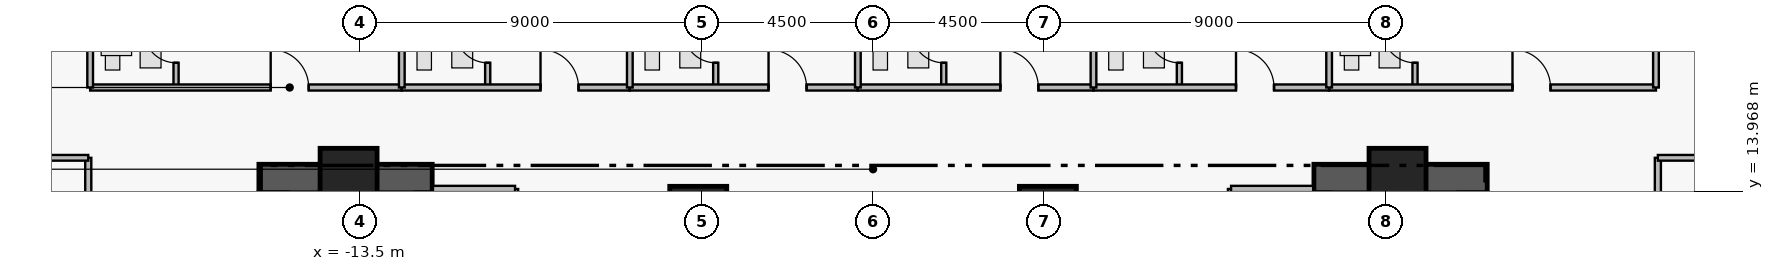
"""IFC4 building model, lengths in metres.
Left out: names, types, materials, properties, quantities, classifications, styles, units other than length and angle.
Written with IfcOpenShell. Run it as: python <this file> out.ifc"""

import sys

from ifc_helpers import new_model, si_unit, direction, frame, frame_2d, origin, origin_2d, place, context, subcontext, project, spatial, rectangle, extrude, element, fill, save


model = new_model("IFC4")
c1 = context("Model", 3, precision=1e-05, world=origin(), true_north=direction((0.0, 1.0)))
c2 = subcontext(c1, "Body", "Model", "MODEL_VIEW")
j1 = project(units=[si_unit("LENGTHUNIT", "METRE"), si_unit("PLANEANGLEUNIT", "RADIAN")], contexts=[c1])
p1 = place(None, origin())
s1 = spatial("IfcSite", under=j1, at=p1, CompositionType="ELEMENT")
p2 = place(p1, origin())
s2 = spatial("IfcBuilding", under=s1, at=p2, CompositionType="ELEMENT")
p3 = place(p2, frame((0.0, 0.0, 99.3)))
s3 = spatial("IfcBuildingStorey", under=s2, at=p3, CompositionType="ELEMENT", Elevation=99.3)
for number, where, z_axis, x_axis in (
    (1, (-16.16, 14.305, 0.0), (0.0, 0.0, 1.0), (1.0, 0.0, 0.0)),
    (2, (11.6, 14.305, 0.0), (0.0, 0.0, 1.0), (1.0, 0.0, 0.0)),
):
    element("IfcWall", number, at=place(p3, frame(where, z_axis=z_axis, x_axis=x_axis)), inside=s3, PredefinedType="SHEAR", context=c2, shape_type="SweptSolid", body=[
        extrude(rectangle(XDim=4.56, YDim=0.75, at=frame_2d((2.28, 0.0))), origin(), (0.0, 0.0, 1.0), 3.46),
    ])
for number, where, z_axis, x_axis in (
    (3, (-13.8, 14.35, 0.0), (0.0, 0.0, 1.0), (1.0, 0.0, 0.0)),
    (4, (-4.6, 13.35, 0.0), (0.0, 0.0, 1.0), (1.0, 0.0, 0.0)),
    (5, (4.6, 13.35, 0.0), (0.0, 0.0, 1.0), (1.0, 0.0, 0.0)),
    (6, (13.8, 14.35, 0.0), (0.0, 0.0, 1.0), (1.0, 0.0, 0.0)),
):
    element("IfcColumn", number, at=place(p3, frame(where, z_axis=z_axis, x_axis=x_axis)), inside=s3, PredefinedType="COLUMN", context=c2, shape_type="SweptSolid", body=[
        extrude(rectangle(XDim=1.5, YDim=1.5, at=origin_2d()), origin(), (0.0, 0.0, 1.0), 3.65),
    ])
p4 = place(p3, frame((-18.34, 16.7, 0.0), z_axis=(0.0, 0.0, 1.0), x_axis=(0.0, 1.0, 0.0)))
e7 = element("IfcWall", 7, at=p4, inside=s3, PredefinedType="PLUMBINGWALL", context=c2, shape_type="SweptSolid", body=[
    extrude(rectangle(XDim=2.36, YDim=0.135, at=frame_2d((1.18, 0.0))), origin(), (0.0, 0.0, 1.0), 3.43),
])
p5 = place(p4, frame((0.65, 0.0, 0.0)))
e8 = element("IfcOpeningElement", 8, at=p5, cuts=e7, PredefinedType="OPENING", context=c2, shape_type="SweptSolid", body=[
    extrude(rectangle(XDim=0.85, YDim=2.1, at=frame_2d((0.425, 1.05))), frame((0.0, 0.077, 0.0), z_axis=(0.0, -1.0, 0.0), x_axis=(1.0, 0.0, 0.0)), (0.0, 0.0, 1.0), 0.155),
])
p6 = place(p3, frame((-20.6, 16.7, 0.0), z_axis=(0.0, 0.0, 1.0), x_axis=(1.0, 0.0, 0.0)))
e9 = element("IfcWall", 9, at=p6, inside=s3, PredefinedType="PARTITIONING", context=c2, shape_type="SweptSolid", body=[
    extrude(rectangle(XDim=8.2, YDim=0.16, at=frame_2d((4.1, 0.0))), origin(), (0.0, 0.0, 1.0), 2.973),
])
p7 = place(p6, frame((4.75, 0.0, 0.0)))
e10 = element("IfcOpeningElement", 10, at=p7, cuts=e9, PredefinedType="OPENING", context=c2, shape_type="SweptSolid", body=[
    extrude(rectangle(XDim=1.0, YDim=2.15, at=frame_2d((0.5, 1.075))), frame((0.0, 0.09, 0.0), z_axis=(0.0, -1.0, 0.0), x_axis=(1.0, 0.0, 0.0)), (0.0, 0.0, 1.0), 0.18),
])
p8 = place(p3, frame((-10.14, 16.7, 0.0), z_axis=(0.0, 0.0, 1.0), x_axis=(0.0, 1.0, 0.0)))
e11 = element("IfcWall", 11, at=p8, inside=s3, PredefinedType="PLUMBINGWALL", context=c2, shape_type="SweptSolid", body=[
    extrude(rectangle(XDim=2.36, YDim=0.135, at=frame_2d((1.18, 0.0))), origin(), (0.0, 0.0, 1.0), 3.43),
])
p9 = place(p8, frame((0.65, 0.0, 0.0)))
e12 = element("IfcOpeningElement", 12, at=p9, cuts=e11, PredefinedType="OPENING", context=c2, shape_type="SweptSolid", body=[
    extrude(rectangle(XDim=0.85, YDim=2.1, at=frame_2d((0.425, 1.05))), frame((0.0, 0.077, 0.0), z_axis=(0.0, -1.0, 0.0), x_axis=(1.0, 0.0, 0.0)), (0.0, 0.0, 1.0), 0.155),
])
p10 = place(p3, frame((-12.4, 16.7, 0.0), z_axis=(0.0, 0.0, 1.0), x_axis=(1.0, 0.0, 0.0)))
e13 = element("IfcWall", 13, at=p10, inside=s3, PredefinedType="PARTITIONING", context=c2, shape_type="SweptSolid", body=[
    extrude(rectangle(XDim=6.0, YDim=0.16, at=frame_2d((3.0, 0.0))), origin(), (0.0, 0.0, 1.0), 2.973),
])
p11 = place(p10, frame((3.65, 0.0, 0.0)))
e14 = element("IfcOpeningElement", 14, at=p11, cuts=e13, PredefinedType="OPENING", context=c2, shape_type="SweptSolid", body=[
    extrude(rectangle(XDim=1.0, YDim=2.15, at=frame_2d((0.5, 1.075))), frame((0.0, 0.09, 0.0), z_axis=(0.0, -1.0, 0.0), x_axis=(1.0, 0.0, 0.0)), (0.0, 0.0, 1.0), 0.18),
])
p12 = place(p3, frame((-4.14, 16.7, 0.0), z_axis=(0.0, 0.0, 1.0), x_axis=(0.0, 1.0, 0.0)))
e15 = element("IfcWall", 15, at=p12, inside=s3, PredefinedType="PLUMBINGWALL", context=c2, shape_type="SweptSolid", body=[
    extrude(rectangle(XDim=2.36, YDim=0.135, at=frame_2d((1.18, 0.0))), origin(), (0.0, 0.0, 1.0), 2.503),
])
p13 = place(p12, frame((0.65, 0.0, 0.0)))
e16 = element("IfcOpeningElement", 16, at=p13, cuts=e15, PredefinedType="OPENING", context=c2, shape_type="SweptSolid", body=[
    extrude(rectangle(XDim=0.85, YDim=2.1, at=frame_2d((0.425, 1.05))), frame((0.0, 0.077, 0.0), z_axis=(0.0, -1.0, 0.0), x_axis=(1.0, 0.0, 0.0)), (0.0, 0.0, 1.0), 0.155),
])
p14 = place(p3, frame((-6.4, 16.7, 0.0), z_axis=(0.0, 0.0, 1.0), x_axis=(1.0, 0.0, 0.0)))
e17 = element("IfcWall", 17, at=p14, inside=s3, PredefinedType="PARTITIONING", context=c2, shape_type="SweptSolid", body=[
    extrude(rectangle(XDim=6.0, YDim=0.16, at=frame_2d((3.0, 0.0))), origin(), (0.0, 0.0, 1.0), 2.973),
])
p15 = place(p14, frame((3.65, 0.0, 0.0)))
e18 = element("IfcOpeningElement", 18, at=p15, cuts=e17, PredefinedType="OPENING", context=c2, shape_type="SweptSolid", body=[
    extrude(rectangle(XDim=1.0, YDim=2.15, at=frame_2d((0.5, 1.075))), frame((0.0, 0.09, 0.0), z_axis=(0.0, -1.0, 0.0), x_axis=(1.0, 0.0, 0.0)), (0.0, 0.0, 1.0), 0.18),
])
p16 = place(p3, frame((1.86, 16.7, 0.0), z_axis=(0.0, 0.0, 1.0), x_axis=(0.0, 1.0, 0.0)))
e19 = element("IfcWall", 19, at=p16, inside=s3, PredefinedType="PLUMBINGWALL", context=c2, shape_type="SweptSolid", body=[
    extrude(rectangle(XDim=2.36, YDim=0.135, at=frame_2d((1.18, 0.0))), origin(), (0.0, 0.0, 1.0), 3.43),
])
p17 = place(p16, frame((0.65, 0.0, 0.0)))
e20 = element("IfcOpeningElement", 20, at=p17, cuts=e19, PredefinedType="OPENING", context=c2, shape_type="SweptSolid", body=[
    extrude(rectangle(XDim=0.85, YDim=2.1, at=frame_2d((0.425, 1.05))), frame((0.0, 0.077, 0.0), z_axis=(0.0, -1.0, 0.0), x_axis=(1.0, 0.0, 0.0)), (0.0, 0.0, 1.0), 0.155),
])
p18 = place(p3, frame((-0.4, 16.7, 0.0), z_axis=(0.0, 0.0, 1.0), x_axis=(1.0, 0.0, 0.0)))
e21 = element("IfcWall", 21, at=p18, inside=s3, PredefinedType="PARTITIONING", context=c2, shape_type="SweptSolid", body=[
    extrude(rectangle(XDim=6.2, YDim=0.16, at=frame_2d((3.1, 0.0))), origin(), (0.0, 0.0, 1.0), 2.973),
])
p19 = place(p18, frame((3.75, 0.0, 0.0)))
e22 = element("IfcOpeningElement", 22, at=p19, cuts=e21, PredefinedType="OPENING", context=c2, shape_type="SweptSolid", body=[
    extrude(rectangle(XDim=1.0, YDim=2.15, at=frame_2d((0.5, 1.075))), frame((0.0, 0.09, 0.0), z_axis=(0.0, -1.0, 0.0), x_axis=(1.0, 0.0, 0.0)), (0.0, 0.0, 1.0), 0.18),
])
p20 = place(p3, frame((8.06, 16.7, 0.0), z_axis=(0.0, 0.0, 1.0), x_axis=(0.0, 1.0, 0.0)))
e23 = element("IfcWall", 23, at=p20, inside=s3, PredefinedType="PLUMBINGWALL", context=c2, shape_type="SweptSolid", body=[
    extrude(rectangle(XDim=2.36, YDim=0.135, at=frame_2d((1.18, 0.0))), origin(), (0.0, 0.0, 1.0), 3.43),
])
p21 = place(p20, frame((0.65, 0.0, 0.0)))
e24 = element("IfcOpeningElement", 24, at=p21, cuts=e23, PredefinedType="OPENING", context=c2, shape_type="SweptSolid", body=[
    extrude(rectangle(XDim=0.85, YDim=2.1, at=frame_2d((0.425, 1.05))), frame((0.0, 0.077, 0.0), z_axis=(0.0, -1.0, 0.0), x_axis=(1.0, 0.0, 0.0)), (0.0, 0.0, 1.0), 0.155),
])
p22 = place(p3, frame((5.8, 16.7, 0.0), z_axis=(0.0, 0.0, 1.0), x_axis=(1.0, 0.0, 0.0)))
e25 = element("IfcWall", 25, at=p22, inside=s3, PredefinedType="PARTITIONING", context=c2, shape_type="SweptSolid", body=[
    extrude(rectangle(XDim=6.2, YDim=0.16, at=frame_2d((3.1, 0.0))), origin(), (0.0, 0.0, 1.0), 2.973),
])
p23 = place(p22, frame((3.75, 0.0, 0.0)))
e26 = element("IfcOpeningElement", 26, at=p23, cuts=e25, PredefinedType="OPENING", context=c2, shape_type="SweptSolid", body=[
    extrude(rectangle(XDim=1.0, YDim=2.15, at=frame_2d((0.5, 1.075))), frame((0.0, 0.09, 0.0), z_axis=(0.0, -1.0, 0.0), x_axis=(1.0, 0.0, 0.0)), (0.0, 0.0, 1.0), 0.18),
])
p24 = place(p3, frame((14.26, 16.7, 0.0), z_axis=(0.0, 0.0, 1.0), x_axis=(0.0, 1.0, 0.0)))
e27 = element("IfcWall", 27, at=p24, inside=s3, PredefinedType="PLUMBINGWALL", context=c2, shape_type="SweptSolid", body=[
    extrude(rectangle(XDim=2.36, YDim=0.135, at=frame_2d((1.18, 0.0))), origin(), (0.0, 0.0, 1.0), 2.503),
])
p25 = place(p24, frame((0.65, 0.0, 0.0)))
e28 = element("IfcOpeningElement", 28, at=p25, cuts=e27, PredefinedType="OPENING", context=c2, shape_type="SweptSolid", body=[
    extrude(rectangle(XDim=0.85, YDim=2.1, at=frame_2d((0.425, 1.05))), frame((0.0, 0.077, 0.0), z_axis=(0.0, -1.0, 0.0), x_axis=(1.0, 0.0, 0.0)), (0.0, 0.0, 1.0), 0.155),
])
p26 = place(p3, frame((12.0, 16.7, 0.0), z_axis=(0.0, 0.0, 1.0), x_axis=(1.0, 0.0, 0.0)))
e29 = element("IfcWall", 29, at=p26, inside=s3, PredefinedType="PARTITIONING", context=c2, shape_type="SweptSolid", body=[
    extrude(rectangle(XDim=8.6, YDim=0.16, at=frame_2d((4.3, 0.0))), origin(), (0.0, 0.0, 1.0), 2.973),
])
p27 = place(p26, frame((4.825, 0.0, 0.0)))
e30 = element("IfcOpeningElement", 30, at=p27, cuts=e29, PredefinedType="OPENING", context=c2, shape_type="SweptSolid", body=[
    extrude(rectangle(XDim=1.0, YDim=2.15, at=frame_2d((0.5, 1.075))), frame((0.0, 0.09, 0.0), z_axis=(0.0, -1.0, 0.0), x_axis=(1.0, 0.0, 0.0)), (0.0, 0.0, 1.0), 0.18),
])
p28 = place(p3, frame((20.65, 7.96, 0.0), z_axis=(0.0, 0.0, 1.0), x_axis=(0.0, 1.0, 0.0)))
e31 = element("IfcWall", 31, at=p28, inside=s3, PredefinedType="PARTITIONING", context=c2, shape_type="SweptSolid", body=[
    extrude(rectangle(XDim=6.89, YDim=0.16, at=frame_2d((3.445, 0.0))), origin(), (0.0, 0.0, 1.0), 3.43),
])
p29 = place(p28, frame((2.985, 0.0, 0.0)))
e32 = element("IfcOpeningElement", 32, at=p29, cuts=e31, PredefinedType="OPENING", context=c2, shape_type="SweptSolid", body=[
    extrude(rectangle(XDim=0.92, YDim=2.12, at=frame_2d((0.46, 1.06))), frame((0.0, 0.09, 0.0), z_axis=(0.0, -1.0, 0.0), x_axis=(1.0, 0.0, 0.0)), (0.0, 0.0, 1.0), 0.18),
])
p30 = place(p3, frame((-20.65, 8.06, 0.0), z_axis=(0.0, 0.0, 1.0), x_axis=(0.0, 1.0, 0.0)))
e33 = element("IfcWall", 33, at=p30, inside=s3, PredefinedType="PARTITIONING", context=c2, shape_type="SweptSolid", body=[
    extrude(rectangle(XDim=6.79, YDim=0.16, at=frame_2d((3.395, 0.0))), origin(), (0.0, 0.0, 1.0), 3.43),
])
p31 = place(p30, frame((2.92, 0.0, 0.0)))
e34 = element("IfcOpeningElement", 34, at=p31, cuts=e33, PredefinedType="OPENING", context=c2, shape_type="SweptSolid", body=[
    extrude(rectangle(XDim=0.95, YDim=2.15, at=frame_2d((0.475, 1.075))), frame((0.0, 0.09, 0.0), z_axis=(0.0, -1.0, 0.0), x_axis=(1.0, 0.0, 0.0)), (0.0, 0.0, 1.0), 0.18),
])
p32 = place(p3, frame((-9.42, 11.07, 0.0), z_axis=(0.0, 0.0, 1.0), x_axis=(0.0, 1.0, 0.0)))
e35 = element("IfcWall", 35, at=p32, inside=s3, PredefinedType="PARTITIONING", context=c2, shape_type="SweptSolid", body=[
    extrude(rectangle(XDim=2.96, YDim=0.165, at=frame_2d((1.48, 0.0))), origin(), (0.0, 0.0, 1.0), 3.43),
])
p33 = place(p3, frame((-11.58, 14.03, 0.0), z_axis=(0.0, 0.0, 1.0), x_axis=(1.0, 0.0, 0.0)))
e36 = element("IfcWall", 36, at=p33, inside=s3, PredefinedType="PARTITIONING", context=c2, shape_type="SweptSolid", body=[
    extrude(rectangle(XDim=2.16, YDim=0.165, at=frame_2d((1.08, 0.0))), origin(), (0.0, 0.0, 1.0), 3.43),
])
p34 = place(p3, frame((9.42, 11.07, 0.0), z_axis=(0.0, 0.0, 1.0), x_axis=(0.0, 1.0, 0.0)))
e37 = element("IfcWall", 37, at=p34, inside=s3, PredefinedType="PARTITIONING", context=c2, shape_type="SweptSolid", body=[
    extrude(rectangle(XDim=2.96, YDim=0.165, at=frame_2d((1.48, 0.0))), origin(), (0.0, 0.0, 1.0), 3.43),
])
p35 = place(p3, frame((9.42, 14.03, 0.0), z_axis=(0.0, 0.0, 1.0), x_axis=(1.0, 0.0, 0.0)))
e38 = element("IfcWall", 38, at=p35, inside=s3, PredefinedType="PARTITIONING", context=c2, shape_type="SweptSolid", body=[
    extrude(rectangle(XDim=2.16, YDim=0.165, at=frame_2d((1.08, 0.0))), origin(), (0.0, 0.0, 1.0), 3.43),
])
p36 = place(p3, frame((-20.6, 16.7, 0.0), z_axis=(0.0, 0.0, 1.0), x_axis=(0.0, 1.0, 0.0)))
e39 = element("IfcWall", 39, at=p36, inside=s3, PredefinedType="PARTITIONING", context=c2, shape_type="SweptSolid", body=[
    extrude(rectangle(XDim=8.2, YDim=0.15, at=frame_2d((4.1, 0.0))), origin(), (0.0, 0.0, 1.0), 3.43),
])
for number, where, z_axis, x_axis in (
    (40, (-12.4, 16.7, 0.0), (0.0, 0.0, 1.0), (0.0, 1.0, 0.0)),
    (41, (-6.4, 16.7, 0.0), (0.0, 0.0, 1.0), (0.0, 1.0, 0.0)),
    (42, (-0.4, 16.7, 0.0), (0.0, 0.0, 1.0), (0.0, 1.0, 0.0)),
    (43, (5.8, 16.7, 0.0), (0.0, 0.0, 1.0), (0.0, 1.0, 0.0)),
    (44, (12.0, 16.7, 0.0), (0.0, 0.0, 1.0), (0.0, 1.0, 0.0)),
):
    element("IfcWall", number, at=place(p3, frame(where, z_axis=z_axis, x_axis=x_axis)), inside=s3, PredefinedType="PARTITIONING", context=c2, shape_type="SweptSolid", body=[
        extrude(rectangle(XDim=11.62, YDim=0.15, at=frame_2d((5.81, 0.0))), origin(), (0.0, 0.0, 1.0), 3.43),
    ])
p37 = place(p3, frame((20.6, 16.7, 0.0), z_axis=(0.0, 0.0, 1.0), x_axis=(0.0, 1.0, 0.0)))
e45 = element("IfcWall", 45, at=p37, inside=s3, PredefinedType="PARTITIONING", context=c2, shape_type="SweptSolid", body=[
    extrude(rectangle(XDim=8.2, YDim=0.15, at=frame_2d((4.1, 0.0))), origin(), (0.0, 0.0, 1.0), 3.43),
])
for number, where, z_axis, x_axis in (
    (46, (20.65, 14.85, 0.0), (0.0, 0.0, 1.0), (1.0, 0.0, 0.0)),
    (47, (-23.84, 14.85, 0.0), (0.0, 0.0, 1.0), (1.0, 0.0, 0.0)),
):
    element("IfcWall", number, at=place(p3, frame(where, z_axis=z_axis, x_axis=x_axis)), inside=s3, PredefinedType="PARTITIONING", context=c2, shape_type="SweptSolid", body=[
        extrude(rectangle(XDim=3.19, YDim=0.15, at=frame_2d((1.595, 0.0))), origin(), (0.0, 0.0, 1.0), 3.43),
    ])
p38 = place(p5, origin())
e48 = element("IfcDoor", 48, at=p38, inside=s3, OperationType="SINGLE_SWING_RIGHT", PredefinedType="DOOR", context=c2, shape_type="SweptSolid", body=[
    extrude(rectangle(XDim=0.85, YDim=2.1, at=frame_2d((0.425, 1.05))), frame((0.0, 0.025, 0.0), z_axis=(0.0, -1.0, 0.0), x_axis=(1.0, 0.0, 0.0)), (0.0, 0.0, 1.0), 0.05),
])
fill(e8, e48)
p39 = place(p7, origin())
e49 = element("IfcDoor", 49, at=p39, inside=s3, OperationType="SINGLE_SWING_LEFT", PredefinedType="DOOR", context=c2, shape_type="SweptSolid", body=[
    extrude(rectangle(XDim=1.0, YDim=2.15, at=frame_2d((0.5, 1.075))), frame((0.0, 0.025, 0.0), z_axis=(0.0, -1.0, 0.0), x_axis=(1.0, 0.0, 0.0)), (0.0, 0.0, 1.0), 0.05),
])
fill(e10, e49)
p40 = place(p9, origin())
e50 = element("IfcDoor", 50, at=p40, inside=s3, OperationType="SINGLE_SWING_RIGHT", PredefinedType="DOOR", context=c2, shape_type="SweptSolid", body=[
    extrude(rectangle(XDim=0.85, YDim=2.1, at=frame_2d((0.425, 1.05))), frame((0.0, 0.025, 0.0), z_axis=(0.0, -1.0, 0.0), x_axis=(1.0, 0.0, 0.0)), (0.0, 0.0, 1.0), 0.05),
])
fill(e12, e50)
p41 = place(p11, origin())
e51 = element("IfcDoor", 51, at=p41, inside=s3, OperationType="SINGLE_SWING_LEFT", PredefinedType="DOOR", context=c2, shape_type="SweptSolid", body=[
    extrude(rectangle(XDim=1.0, YDim=2.15, at=frame_2d((0.5, 1.075))), frame((0.0, 0.025, 0.0), z_axis=(0.0, -1.0, 0.0), x_axis=(1.0, 0.0, 0.0)), (0.0, 0.0, 1.0), 0.05),
])
fill(e14, e51)
p42 = place(p13, origin())
e52 = element("IfcDoor", 52, at=p42, inside=s3, OperationType="SINGLE_SWING_RIGHT", PredefinedType="DOOR", context=c2, shape_type="SweptSolid", body=[
    extrude(rectangle(XDim=0.85, YDim=2.1, at=frame_2d((0.425, 1.05))), frame((0.0, 0.025, 0.0), z_axis=(0.0, -1.0, 0.0), x_axis=(1.0, 0.0, 0.0)), (0.0, 0.0, 1.0), 0.05),
])
fill(e16, e52)
p43 = place(p15, origin())
e53 = element("IfcDoor", 53, at=p43, inside=s3, OperationType="SINGLE_SWING_LEFT", PredefinedType="DOOR", context=c2, shape_type="SweptSolid", body=[
    extrude(rectangle(XDim=1.0, YDim=2.15, at=frame_2d((0.5, 1.075))), frame((0.0, 0.025, 0.0), z_axis=(0.0, -1.0, 0.0), x_axis=(1.0, 0.0, 0.0)), (0.0, 0.0, 1.0), 0.05),
])
fill(e18, e53)
p44 = place(p17, origin())
e54 = element("IfcDoor", 54, at=p44, inside=s3, OperationType="SINGLE_SWING_RIGHT", PredefinedType="DOOR", context=c2, shape_type="SweptSolid", body=[
    extrude(rectangle(XDim=0.85, YDim=2.1, at=frame_2d((0.425, 1.05))), frame((0.0, 0.025, 0.0), z_axis=(0.0, -1.0, 0.0), x_axis=(1.0, 0.0, 0.0)), (0.0, 0.0, 1.0), 0.05),
])
fill(e20, e54)
p45 = place(p19, origin())
e55 = element("IfcDoor", 55, at=p45, inside=s3, OperationType="SINGLE_SWING_LEFT", PredefinedType="DOOR", context=c2, shape_type="SweptSolid", body=[
    extrude(rectangle(XDim=1.0, YDim=2.15, at=frame_2d((0.5, 1.075))), frame((0.0, 0.025, 0.0), z_axis=(0.0, -1.0, 0.0), x_axis=(1.0, 0.0, 0.0)), (0.0, 0.0, 1.0), 0.05),
])
fill(e22, e55)
p46 = place(p21, origin())
e56 = element("IfcDoor", 56, at=p46, inside=s3, OperationType="SINGLE_SWING_RIGHT", PredefinedType="DOOR", context=c2, shape_type="SweptSolid", body=[
    extrude(rectangle(XDim=0.85, YDim=2.1, at=frame_2d((0.425, 1.05))), frame((0.0, 0.025, 0.0), z_axis=(0.0, -1.0, 0.0), x_axis=(1.0, 0.0, 0.0)), (0.0, 0.0, 1.0), 0.05),
])
fill(e24, e56)
p47 = place(p23, origin())
e57 = element("IfcDoor", 57, at=p47, inside=s3, OperationType="SINGLE_SWING_LEFT", PredefinedType="DOOR", context=c2, shape_type="SweptSolid", body=[
    extrude(rectangle(XDim=1.0, YDim=2.15, at=frame_2d((0.5, 1.075))), frame((0.0, 0.025, 0.0), z_axis=(0.0, -1.0, 0.0), x_axis=(1.0, 0.0, 0.0)), (0.0, 0.0, 1.0), 0.05),
])
fill(e26, e57)
p48 = place(p25, origin())
e58 = element("IfcDoor", 58, at=p48, inside=s3, OperationType="SINGLE_SWING_RIGHT", PredefinedType="DOOR", context=c2, shape_type="SweptSolid", body=[
    extrude(rectangle(XDim=0.85, YDim=2.1, at=frame_2d((0.425, 1.05))), frame((0.0, 0.025, 0.0), z_axis=(0.0, -1.0, 0.0), x_axis=(1.0, 0.0, 0.0)), (0.0, 0.0, 1.0), 0.05),
])
fill(e28, e58)
p49 = place(p27, origin())
e59 = element("IfcDoor", 59, at=p49, inside=s3, OperationType="SINGLE_SWING_LEFT", PredefinedType="DOOR", context=c2, shape_type="SweptSolid", body=[
    extrude(rectangle(XDim=1.0, YDim=2.15, at=frame_2d((0.5, 1.075))), frame((0.0, 0.025, 0.0), z_axis=(0.0, -1.0, 0.0), x_axis=(1.0, 0.0, 0.0)), (0.0, 0.0, 1.0), 0.05),
])
fill(e30, e59)
save(model, sys.argv[1])
